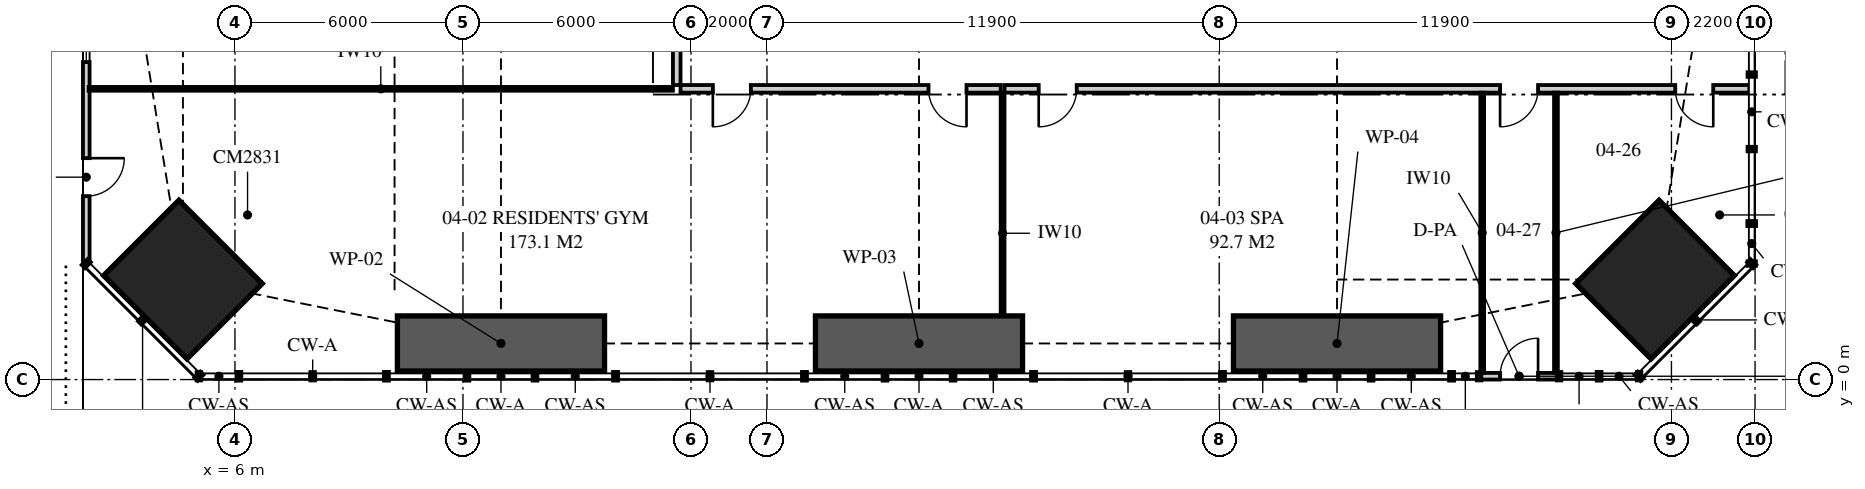
"""IFC4 building model, lengths in metres.
Left out: names, types, materials, properties, quantities, classifications, styles, units other than length and angle.
Written with IfcOpenShell. Run it as: python <this file> out.ifc"""

import sys

from ifc_helpers import new_model, si_unit, direction, frame, frame_2d, origin, origin_2d, place, context, subcontext, project, spatial, polyline, rectangle, outline, extrude, element, fill, save


model = new_model("IFC4")
c1 = context("Model", 3, precision=1e-05, world=origin(), true_north=direction((0.0, 1.0)))
c2 = subcontext(c1, "Body", "Model", "MODEL_VIEW")
j1 = project(units=[si_unit("LENGTHUNIT", "METRE"), si_unit("PLANEANGLEUNIT", "RADIAN")], contexts=[c1])
p1 = place(None, origin())
s1 = spatial("IfcSite", under=j1, at=p1, CompositionType="ELEMENT")
p2 = place(p1, origin())
s2 = spatial("IfcBuilding", under=s1, at=p2, CompositionType="ELEMENT")
p3 = place(p2, frame((0.0, 0.0, 21.0)))
s3 = spatial("IfcBuildingStorey", under=s2, at=p3, CompositionType="ELEMENT", Elevation=21.0)
for number, where, z_axis, x_axis in (
    (1, (4.631, 2.631, 0.0), (0.0, 0.0, 1.0), (0.707, 0.707, 0.0)),
    (2, (43.369, 2.631, 0.0), (0.0, 0.0, 1.0), (-0.707, 0.707, 0.0)),
):
    element("IfcColumn", number, at=place(p3, frame(where, z_axis=z_axis, x_axis=x_axis)), inside=s3, PredefinedType="COLUMN", context=c2, shape_type="SweptSolid", body=[
        extrude(rectangle(XDim=2.8, YDim=3.1, at=origin_2d()), origin(), (0.0, 0.0, 1.0), 3.35),
    ])
p4 = place(p3, frame((2.087, 34.949, 0.0), z_axis=(0.0, 0.0, 1.0), x_axis=(0.0, -1.0, 0.0)))
e3 = element("IfcWall", 3, at=p4, inside=s3, PredefinedType="SOLIDWALL", context=c2, shape_type="SweptSolid", body=[
    extrude(outline(polyline([(0.0, 0.0), (31.897, 0.0), (31.897, 3.11), (22.167, 3.11), (22.167, 2.15), (22.074, 2.15), (22.074, 3.11), (21.949, 3.11), (21.949, 2.15), (9.949, 2.15), (9.949, 3.11), (9.823, 3.11), (9.823, 2.15), (9.73, 2.15), (9.73, 3.11), (0.0, 3.11), (0.0, 0.0)])), frame((0.0, 0.087, 0.0), z_axis=(0.0, -1.0, 0.0), x_axis=(1.0, 0.0, 0.0)), (0.0, 0.0, 1.0), 0.175),
])
p5 = place(p4, frame((1.783, 0.0, 0.0)))
e4 = element("IfcOpeningElement", 4, at=p5, cuts=e3, PredefinedType="OPENING", context=c2, shape_type="SweptSolid", body=[
    extrude(rectangle(XDim=2.7, YDim=2.1, at=frame_2d((1.35, 1.05))), frame((0.0, 0.097, 0.0), z_axis=(0.0, -1.0, 0.0), x_axis=(1.0, 0.0, 0.0)), (0.0, 0.0, 1.0), 0.195),
])
p6 = place(p4, frame((6.112, 0.0, 0.0)))
e5 = element("IfcOpeningElement", 5, at=p6, cuts=e3, PredefinedType="OPENING", context=c2, shape_type="SweptSolid", body=[
    extrude(rectangle(XDim=1.0, YDim=2.1, at=frame_2d((0.5, 1.05))), frame((0.0, 0.097, 0.0), z_axis=(0.0, -1.0, 0.0), x_axis=(1.0, 0.0, 0.0)), (0.0, 0.0, 1.0), 0.195),
])
p7 = place(p4, frame((12.788, 0.0, 0.4)))
e6 = element("IfcOpeningElement", 6, at=p7, cuts=e3, PredefinedType="OPENING", context=c2, shape_type="SweptSolid", body=[
    extrude(rectangle(XDim=1.2, YDim=1.7, at=frame_2d((0.6, 0.85))), frame((0.0, 0.097, 0.0), z_axis=(0.0, -1.0, 0.0), x_axis=(1.0, 0.0, 0.0)), (0.0, 0.0, 1.0), 0.195),
])
p8 = place(p4, frame((14.949, 0.0, 0.4)))
e7 = element("IfcOpeningElement", 7, at=p8, cuts=e3, PredefinedType="OPENING", context=c2, shape_type="SweptSolid", body=[
    extrude(rectangle(XDim=3.0, YDim=1.7, at=frame_2d((1.5, 0.85))), frame((0.0, 0.097, 0.0), z_axis=(0.0, -1.0, 0.0), x_axis=(1.0, 0.0, 0.0)), (0.0, 0.0, 1.0), 0.195),
])
p9 = place(p4, frame((24.795, 0.0, 0.4)))
e8 = element("IfcOpeningElement", 8, at=p9, cuts=e3, PredefinedType="OPENING", context=c2, shape_type="SweptSolid", body=[
    extrude(rectangle(XDim=1.8, YDim=1.7, at=frame_2d((0.9, 0.85))), frame((0.0, 0.097, 0.0), z_axis=(0.0, -1.0, 0.0), x_axis=(1.0, 0.0, 0.0)), (0.0, 0.0, 1.0), 0.195),
])
p10 = place(p4, frame((29.123, 0.0, 0.0)))
e9 = element("IfcOpeningElement", 9, at=p10, cuts=e3, PredefinedType="OPENING", context=c2, shape_type="SweptSolid", body=[
    extrude(rectangle(XDim=1.0, YDim=2.1, at=frame_2d((0.5, 1.05))), frame((0.0, 0.097, 0.0), z_axis=(0.0, -1.0, 0.0), x_axis=(1.0, 0.0, 0.0)), (0.0, 0.0, 1.0), 0.195),
])
p11 = place(p3, frame((17.725, 7.65, 0.0), z_axis=(0.0, 0.0, 1.0), x_axis=(1.0, 0.0, 0.0)))
e10 = element("IfcWall", 10, at=p11, inside=s3, PredefinedType="PARTITIONING", context=c2, shape_type="SweptSolid", body=[
    extrude(outline(polyline([(0.0, 0.0), (8.425, 0.0), (8.425, 3.11), (6.612, 3.11), (6.612, 2.541), (5.938, 2.541), (5.938, 3.11), (0.0, 3.11), (0.0, 0.0)])), frame((0.0, 0.1, 0.0), z_axis=(0.0, -1.0, 0.0), x_axis=(1.0, 0.0, 0.0)), (0.0, 0.0, 1.0), 0.2),
])
p12 = place(p11, frame((0.85, 0.0, 0.0)))
e11 = element("IfcOpeningElement", 11, at=p12, cuts=e10, PredefinedType="OPENING", context=c2, shape_type="SweptSolid", body=[
    extrude(rectangle(XDim=1.0, YDim=2.1, at=frame_2d((0.5, 1.05))), frame((0.0, 0.11, 0.0), z_axis=(0.0, -1.0, 0.0), x_axis=(1.0, 0.0, 0.0)), (0.0, 0.0, 1.0), 0.22),
])
p13 = place(p11, frame((6.525, 0.0, 0.0)))
e12 = element("IfcOpeningElement", 12, at=p13, cuts=e10, PredefinedType="OPENING", context=c2, shape_type="SweptSolid", body=[
    extrude(rectangle(XDim=1.0, YDim=2.1, at=frame_2d((0.5, 1.05))), frame((0.0, 0.11, 0.0), z_axis=(0.0, -1.0, 0.0), x_axis=(1.0, 0.0, 0.0)), (0.0, 0.0, 1.0), 0.22),
])
p14 = place(p3, frame((26.25, 7.65, 0.0), z_axis=(0.0, 0.0, 1.0), x_axis=(1.0, 0.0, 0.0)))
e13 = element("IfcWall", 13, at=p14, inside=s3, PredefinedType="PARTITIONING", context=c2, shape_type="SweptSolid", body=[
    extrude(outline(polyline([(0.0, 0.0), (19.6, 0.0), (19.6, 3.11), (18.854, 3.11), (18.854, 2.15), (17.01, 2.15), (17.01, 3.11), (9.087, 3.11), (9.087, 2.541), (8.413, 2.541), (8.413, 3.11), (0.0, 3.11), (0.0, 0.0)])), frame((0.0, 0.1, 0.0), z_axis=(0.0, -1.0, 0.0), x_axis=(1.0, 0.0, 0.0)), (0.0, 0.0, 1.0), 0.2),
])
p15 = place(p14, frame((0.9, 0.0, 0.0)))
e14 = element("IfcOpeningElement", 14, at=p15, cuts=e13, PredefinedType="OPENING", context=c2, shape_type="SweptSolid", body=[
    extrude(rectangle(XDim=1.0, YDim=2.1, at=frame_2d((0.5, 1.05))), frame((0.0, 0.11, 0.0), z_axis=(0.0, -1.0, 0.0), x_axis=(1.0, 0.0, 0.0)), (0.0, 0.0, 1.0), 0.22),
])
p16 = place(p14, frame((17.65, 0.0, 0.0)))
e15 = element("IfcOpeningElement", 15, at=p16, cuts=e13, PredefinedType="OPENING", context=c2, shape_type="SweptSolid", body=[
    extrude(rectangle(XDim=1.0, YDim=2.1, at=frame_2d((0.5, 1.05))), frame((0.0, 0.11, 0.0), z_axis=(0.0, -1.0, 0.0), x_axis=(1.0, 0.0, 0.0)), (0.0, 0.0, 1.0), 0.22),
])
p17 = place(p14, frame((13.041, 0.0, 0.0)))
e16 = element("IfcOpeningElement", 16, at=p17, cuts=e13, PredefinedType="OPENING", context=c2, shape_type="SweptSolid", body=[
    extrude(rectangle(XDim=1.0, YDim=2.1, at=frame_2d((0.5, 1.05))), frame((0.0, 0.11, 0.0), z_axis=(0.0, -1.0, 0.0), x_axis=(1.0, 0.0, 0.0)), (0.0, 0.0, 1.0), 0.22),
])
p18 = place(p3, frame((17.625, 7.75, 0.0), z_axis=(0.0, 0.0, 1.0), x_axis=(0.0, 1.0, 0.0)))
e17 = element("IfcWall", 17, at=p18, inside=s3, PredefinedType="PARTITIONING", context=c2, shape_type="SweptSolid", body=[
    extrude(rectangle(XDim=1.55, YDim=0.2, at=frame_2d((0.775, 0.0))), origin(), (0.0, 0.0, 1.0), 3.11),
])
p19 = place(p3, frame((26.2, 0.15, 0.0), z_axis=(0.0, 0.0, 1.0), x_axis=(0.0, 1.0, 0.0)))
e18 = element("IfcWall", 18, at=p19, inside=s3, PredefinedType="PARTITIONING", context=c2, shape_type="SweptSolid", body=[
    extrude(outline(polyline([(0.0, 0.0), (7.4, 0.0), (7.4, 3.11), (1.66, 3.11), (1.66, 2.15), (0.0, 2.15), (0.0, 3.11), (0.0, 0.0)])), frame((0.0, 0.05, 0.0), z_axis=(0.0, -1.0, 0.0), x_axis=(1.0, 0.0, 0.0)), (0.0, 0.0, 1.0), 0.1),
])
p20 = place(p3, frame((2.15, 7.65, 0.0), z_axis=(0.0, 0.0, 1.0), x_axis=(1.0, 0.0, 0.0)))
e19 = element("IfcWall", 19, at=p20, inside=s3, PredefinedType="PARTITIONING", context=c2, shape_type="SweptSolid", body=[
    extrude(outline(polyline([(0.0, 0.0), (15.375, 0.0), (15.375, 3.11), (11.137, 3.11), (11.137, 2.541), (10.562, 2.541), (10.562, 3.11), (9.31, 3.11), (9.31, 2.51), (6.79, 2.51), (6.79, 3.11), (2.769, 3.11), (2.769, 2.541), (2.539, 2.541), (2.539, 2.15), (0.796, 2.15), (0.796, 3.11), (0.0, 3.11), (0.0, 0.0)])), frame((0.0, 0.05, 0.0), z_axis=(0.0, -1.0, 0.0), x_axis=(1.0, 0.0, 0.0)), (0.0, 0.0, 1.0), 0.1),
])
p21 = place(p3, frame((38.771, 0.087, 0.0), z_axis=(0.0, 0.0, 1.0), x_axis=(1.0, 0.0, 0.0)))
e20 = element("IfcWall", 20, at=p21, inside=s3, PredefinedType="SOLIDWALL", context=c2, shape_type="SweptSolid", body=[
    extrude(rectangle(XDim=2.04, YDim=0.175, at=frame_2d((1.02, 0.0))), origin(), (0.0, 0.0, 1.0), 3.11),
])
p22 = place(p21, frame((0.52, 0.0, 0.0)))
e21 = element("IfcOpeningElement", 21, at=p22, cuts=e20, PredefinedType="OPENING", context=c2, shape_type="SweptSolid", body=[
    extrude(rectangle(XDim=1.0, YDim=2.1, at=frame_2d((0.5, 1.05))), frame((0.0, 0.097, 0.0), z_axis=(0.0, -1.0, 0.0), x_axis=(1.0, 0.0, 0.0)), (0.0, 0.0, 1.0), 0.195),
])
p23 = place(p3, frame((38.82, 0.175, 0.0), z_axis=(0.0, 0.0, 1.0), x_axis=(0.0, 1.0, 0.0)))
e22 = element("IfcWall", 22, at=p23, inside=s3, PredefinedType="PARTITIONING", context=c2, shape_type="SweptSolid", body=[
    extrude(outline(polyline([(0.0, 0.0), (7.375, 0.0), (7.375, 3.11), (3.716, 3.11), (3.716, 2.51), (2.42, 2.51), (2.42, 2.15), (0.665, 2.15), (0.665, 3.11), (0.0, 3.11), (0.0, 0.0)])), frame((0.0, 0.05, 0.0), z_axis=(0.0, -1.0, 0.0), x_axis=(1.0, 0.0, 0.0)), (0.0, 0.0, 1.0), 0.1),
])
p24 = place(p3, frame((40.761, 0.175, 0.0), z_axis=(0.0, 0.0, 1.0), x_axis=(0.0, 1.0, 0.0)))
e23 = element("IfcWall", 23, at=p24, inside=s3, PredefinedType="PARTITIONING", context=c2, shape_type="SweptSolid", body=[
    extrude(outline(polyline([(0.0, 0.0), (7.375, 0.0), (7.375, 3.11), (3.716, 3.11), (3.716, 2.51), (2.81, 2.51), (2.81, 2.15), (1.055, 2.15), (1.055, 3.11), (0.0, 3.11), (0.0, 0.0)])), frame((0.0, 0.05, 0.0), z_axis=(0.0, -1.0, 0.0), x_axis=(1.0, 0.0, 0.0)), (0.0, 0.0, 1.0), 0.1),
])
for number, where, z_axis, x_axis in (
    (24, (10.275, 0.95, 0.0), (0.0, 0.0, 1.0), (1.0, 0.0, 0.0)),
    (25, (21.275, 0.95, 0.0), (0.0, 0.0, 1.0), (1.0, 0.0, 0.0)),
    (26, (32.275, 0.95, 0.0), (0.0, 0.0, 1.0), (1.0, 0.0, 0.0)),
):
    element("IfcWall", number, at=place(p3, frame(where, z_axis=z_axis, x_axis=x_axis)), inside=s3, PredefinedType="SHEAR", context=c2, shape_type="SweptSolid", body=[
        extrude(rectangle(XDim=5.45, YDim=1.45, at=frame_2d((2.725, 0.0))), origin(), (0.0, 0.0, 1.0), 3.35),
    ])
p25 = place(p9, origin())
e27 = element("IfcWindow", 27, at=p25, inside=s3, PartitioningType="SINGLE_PANEL", PredefinedType="WINDOW", context=c2, shape_type="SweptSolid", body=[
    extrude(rectangle(XDim=1.8, YDim=1.7, at=frame_2d((0.9, 0.85))), frame((0.0, 0.03, 0.0), z_axis=(0.0, -1.0, 0.0), x_axis=(1.0, 0.0, 0.0)), (0.0, 0.0, 1.0), 0.06),
])
fill(e8, e27)
p26 = place(p10, origin())
e28 = element("IfcDoor", 28, at=p26, inside=s3, OperationType="SINGLE_SWING_LEFT", PredefinedType="DOOR", context=c2, shape_type="SweptSolid", body=[
    extrude(rectangle(XDim=1.0, YDim=2.1, at=frame_2d((0.5, 1.05))), frame((0.0, 0.025, 0.0), z_axis=(0.0, -1.0, 0.0), x_axis=(1.0, 0.0, 0.0)), (0.0, 0.0, 1.0), 0.05),
])
fill(e9, e28)
p27 = place(p12, frame((1.0, 0.0, 0.0), z_axis=(0.0, 0.0, 1.0), x_axis=(-1.0, 0.0, 0.0)))
e29 = element("IfcDoor", 29, at=p27, inside=s3, OperationType="SINGLE_SWING_RIGHT", PredefinedType="DOOR", context=c2, shape_type="SweptSolid", body=[
    extrude(rectangle(XDim=1.0, YDim=2.1, at=frame_2d((0.5, 1.05))), frame((0.0, 0.025, 0.0), z_axis=(0.0, -1.0, 0.0), x_axis=(1.0, 0.0, 0.0)), (0.0, 0.0, 1.0), 0.05),
])
fill(e11, e29)
p28 = place(p13, frame((1.0, 0.0, 0.0), z_axis=(0.0, 0.0, 1.0), x_axis=(-1.0, 0.0, 0.0)))
e30 = element("IfcDoor", 30, at=p28, inside=s3, OperationType="SINGLE_SWING_LEFT", PredefinedType="DOOR", context=c2, shape_type="SweptSolid", body=[
    extrude(rectangle(XDim=1.0, YDim=2.1, at=frame_2d((0.5, 1.05))), frame((0.0, 0.025, 0.0), z_axis=(0.0, -1.0, 0.0), x_axis=(1.0, 0.0, 0.0)), (0.0, 0.0, 1.0), 0.05),
])
fill(e12, e30)
p29 = place(p15, frame((1.0, 0.0, 0.0), z_axis=(0.0, 0.0, 1.0), x_axis=(-1.0, 0.0, 0.0)))
e31 = element("IfcDoor", 31, at=p29, inside=s3, OperationType="SINGLE_SWING_RIGHT", PredefinedType="DOOR", context=c2, shape_type="SweptSolid", body=[
    extrude(rectangle(XDim=1.0, YDim=2.1, at=frame_2d((0.5, 1.05))), frame((0.0, 0.025, 0.0), z_axis=(0.0, -1.0, 0.0), x_axis=(1.0, 0.0, 0.0)), (0.0, 0.0, 1.0), 0.05),
])
fill(e14, e31)
p30 = place(p16, frame((1.0, 0.0, 0.0), z_axis=(0.0, 0.0, 1.0), x_axis=(-1.0, 0.0, 0.0)))
e32 = element("IfcDoor", 32, at=p30, inside=s3, OperationType="SINGLE_SWING_LEFT", PredefinedType="DOOR", context=c2, shape_type="SweptSolid", body=[
    extrude(rectangle(XDim=1.0, YDim=2.1, at=frame_2d((0.5, 1.05))), frame((0.0, 0.025, 0.0), z_axis=(0.0, -1.0, 0.0), x_axis=(1.0, 0.0, 0.0)), (0.0, 0.0, 1.0), 0.05),
])
fill(e15, e32)
p31 = place(p17, frame((1.0, 0.0, 0.0), z_axis=(0.0, 0.0, 1.0), x_axis=(-1.0, 0.0, 0.0)))
e33 = element("IfcDoor", 33, at=p31, inside=s3, OperationType="SINGLE_SWING_RIGHT", PredefinedType="DOOR", context=c2, shape_type="SweptSolid", body=[
    extrude(rectangle(XDim=1.0, YDim=2.1, at=frame_2d((0.5, 1.05))), frame((0.0, 0.025, 0.0), z_axis=(0.0, -1.0, 0.0), x_axis=(1.0, 0.0, 0.0)), (0.0, 0.0, 1.0), 0.05),
])
fill(e16, e33)
p32 = place(p22, origin())
e34 = element("IfcDoor", 34, at=p32, inside=s3, OperationType="SINGLE_SWING_RIGHT", PredefinedType="DOOR", context=c2, shape_type="SweptSolid", body=[
    extrude(rectangle(XDim=1.0, YDim=2.1, at=frame_2d((0.5, 1.05))), frame((0.0, 0.025, 0.0), z_axis=(0.0, -1.0, 0.0), x_axis=(1.0, 0.0, 0.0)), (0.0, 0.0, 1.0), 0.05),
])
fill(e21, e34)
save(model, sys.argv[1])
